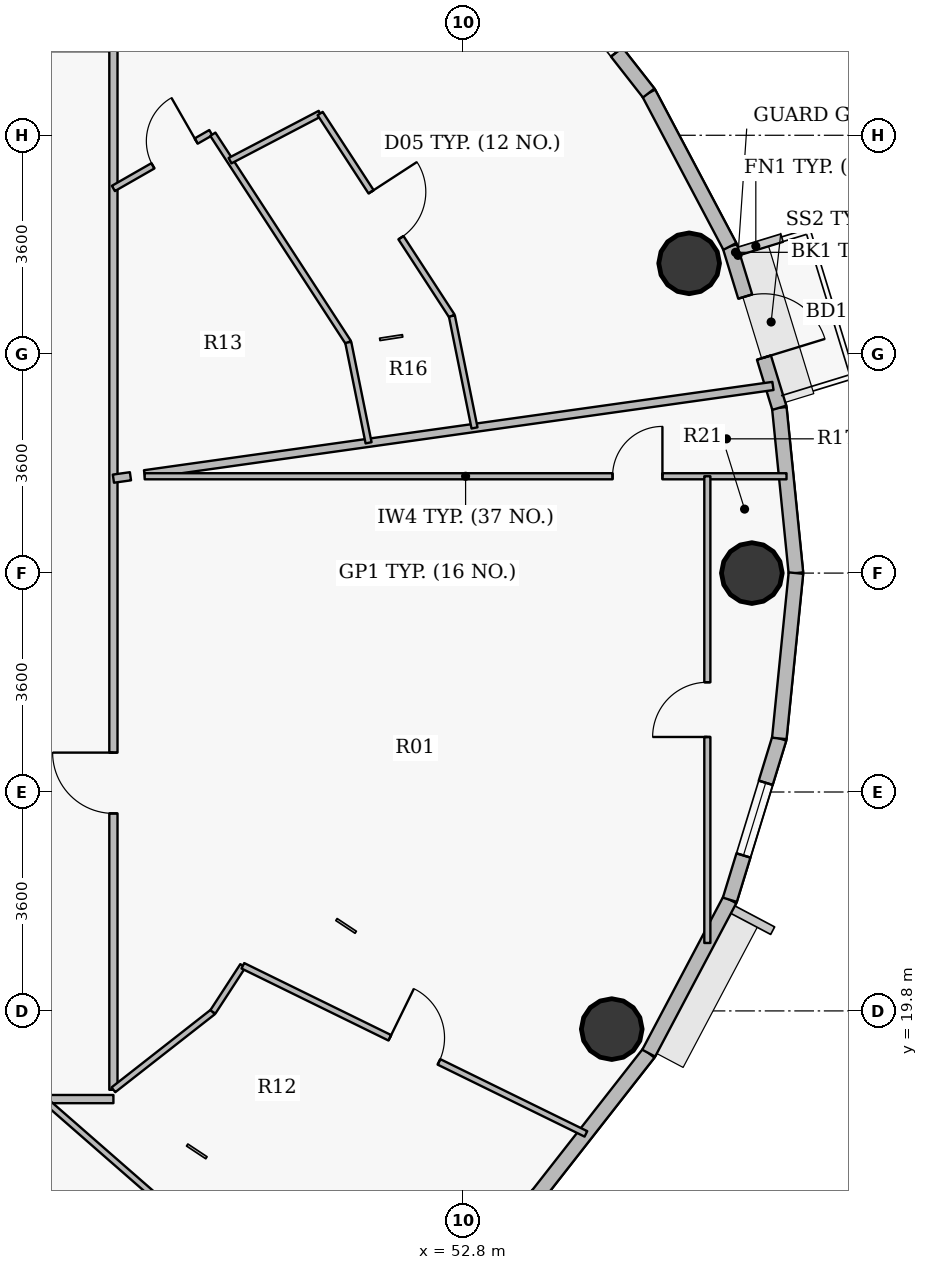
"""IFC4 building model, lengths in metres.
Left out: names, types, materials, properties, quantities, classifications, styles, units other than length and angle.
Written with IfcOpenShell. Run it as: python <this file> out.ifc"""

import sys

from ifc_helpers import new_model, si_unit, direction, frame, frame_2d, origin, origin_2d, place, context, subcontext, project, spatial, rectangle, hollow_circle, extrude, source, transform, mapped, element, fill, save


model = new_model("IFC4")
c1 = context("Model", 3, precision=1e-05, world=origin(), true_north=direction((0.0, 1.0)))
c2 = subcontext(c1, "Body", "Model", "MODEL_VIEW")
j1 = project(units=[si_unit("LENGTHUNIT", "METRE"), si_unit("PLANEANGLEUNIT", "RADIAN")], contexts=[c1])
p1 = place(None, origin())
s1 = spatial("IfcSite", under=j1, at=p1, CompositionType="ELEMENT")
p2 = place(p1, origin())
s2 = spatial("IfcBuilding", under=s1, at=p2, CompositionType="ELEMENT")
p3 = place(p2, frame((0.0, 0.0, 273.0)))
s3 = spatial("IfcBuildingStorey", under=s2, at=p3, CompositionType="ELEMENT", Elevation=273.0)
for number, where, z_axis, x_axis in (
    (1, (57.55, 27.0, 0.0), (0.0, 0.0, 1.0), (1.0, 0.0, 0.0)),
    (2, (56.519, 32.094, 0.0), (0.0, 0.0, 1.0), (1.0, 0.0, 0.0)),
    (3, (55.246, 19.5, 0.0), (0.0, 0.0, 1.0), (1.0, 0.0, 0.0)),
):
    element("IfcColumn", number, at=place(p3, frame(where, z_axis=z_axis, x_axis=x_axis)), inside=s3, PredefinedType="COLUMN", context=c2, shape_type="SweptSolid", body=[
        extrude(hollow_circle(Radius=0.5, WallThickness=0.032, at=origin_2d()), origin(), (0.0, 0.0, 1.0), 3.75),
    ])
p4 = place(p3, frame((58.002, 29.719, 0.0), z_axis=(0.0, 0.0, 1.0), x_axis=(0.099972526841, -0.99499019788, 0.0)))
e4 = element("IfcWall", 4, at=p4, inside=s3, PredefinedType="SOLIDWALL", context=c2, shape_type="SweptSolid", body=[
    extrude(rectangle(XDim=2.733, YDim=0.24, at=frame_2d((1.366, 0.0))), origin(), (0.0, 0.0, 1.0), 3.5),
])
p5 = place(p3, frame((57.188, 32.372, 0.0), z_axis=(0.0, 0.0, 1.0), x_axis=(0.2931213403, -0.956075248012, 0.0)))
e5 = element("IfcWall", 5, at=p5, inside=s3, PredefinedType="SOLIDWALL", context=c2, shape_type="SweptSolid", body=[
    extrude(rectangle(XDim=2.775, YDim=0.24, at=frame_2d((1.388, 0.0))), origin(), (0.0, 0.0, 1.0), 3.5),
])
p6 = place(p5, frame((0.863, 0.0, 0.0)))
e6 = element("IfcOpeningElement", 6, at=p6, cuts=e5, PredefinedType="OPENING", context=c2, shape_type="SweptSolid", body=[
    extrude(rectangle(XDim=1.05, YDim=2.15, at=origin_2d()), frame((0.525, 0.13, 1.075), z_axis=(0.0, -1.0, 0.0), x_axis=(1.0, 0.0, 0.0)), (0.0, 0.0, 1.0), 0.26),
])
p7 = place(p3, frame((55.854, 34.895, 0.0), z_axis=(0.0, 0.0, 1.0), x_axis=(0.467628269026, -0.883925224218, 0.0)))
e7 = element("IfcWall", 7, at=p7, inside=s3, PredefinedType="SOLIDWALL", context=c2, shape_type="SweptSolid", body=[
    extrude(rectangle(XDim=2.854, YDim=0.24, at=frame_2d((1.427, 0.0))), origin(), (0.0, 0.0, 1.0), 3.5),
])
p8 = place(p3, frame((54.03, 37.225, 0.0), z_axis=(0.0, 0.0, 1.0), x_axis=(0.616337186556, -0.787482363275, 0.0)))
e8 = element("IfcWall", 8, at=p8, inside=s3, PredefinedType="SOLIDWALL", context=c2, shape_type="SweptSolid", body=[
    extrude(rectangle(XDim=2.958, YDim=0.24, at=frame_2d((1.479, 0.0))), origin(), (0.0, 0.0, 1.0), 3.5),
])
p9 = place(p8, frame((0.854, 0.0, 0.9)))
e9 = element("IfcOpeningElement", 9, at=p9, cuts=e8, PredefinedType="OPENING", context=c2, shape_type="SweptSolid", body=[
    extrude(rectangle(XDim=1.25, YDim=1.65, at=origin_2d()), frame((0.625, 0.13, 0.825), z_axis=(0.0, -1.0, 0.0), x_axis=(1.0, 0.0, 0.0)), (0.0, 0.0, 1.0), 0.26),
])
p10 = place(p3, frame((54.03, 16.775, 0.0), z_axis=(0.0, 0.0, 1.0), x_axis=(-0.737068506972, -0.675818034703, 0.0)))
e10 = element("IfcWall", 10, at=p10, inside=s3, PredefinedType="SOLIDWALL", context=c2, shape_type="SweptSolid", body=[
    extrude(rectangle(XDim=3.077, YDim=0.24, at=frame_2d((1.539, 0.0))), origin(), (0.0, 0.0, 1.0), 3.5),
])
p11 = place(p3, frame((55.854, 19.105, 0.0), z_axis=(0.0, 0.0, 1.0), x_axis=(-0.616337186556, -0.787482363275, 0.0)))
e11 = element("IfcWall", 11, at=p11, inside=s3, PredefinedType="SOLIDWALL", context=c2, shape_type="SweptSolid", body=[
    extrude(rectangle(XDim=2.958, YDim=0.24, at=frame_2d((1.479, 0.0))), origin(), (0.0, 0.0, 1.0), 3.5),
])
p12 = place(p3, frame((57.188, 21.628, 0.0), z_axis=(0.0, 0.0, 1.0), x_axis=(-0.467628269026, -0.883925224218, 0.0)))
e12 = element("IfcWall", 12, at=p12, inside=s3, PredefinedType="SOLIDWALL", context=c2, shape_type="SweptSolid", body=[
    extrude(rectangle(XDim=2.854, YDim=0.24, at=frame_2d((1.427, 0.0))), origin(), (0.0, 0.0, 1.0), 3.5),
])
p13 = place(p3, frame((58.002, 24.281, 0.0), z_axis=(0.0, 0.0, 1.0), x_axis=(-0.2931213403, -0.956075248012, 0.0)))
e13 = element("IfcWall", 13, at=p13, inside=s3, PredefinedType="SOLIDWALL", context=c2, shape_type="SweptSolid", body=[
    extrude(rectangle(XDim=2.775, YDim=0.24, at=frame_2d((1.388, 0.0))), origin(), (0.0, 0.0, 1.0), 3.5),
])
p14 = place(p13, frame((0.763, 0.0, 0.9)))
e14 = element("IfcOpeningElement", 14, at=p14, cuts=e13, PredefinedType="OPENING", context=c2, shape_type="SweptSolid", body=[
    extrude(rectangle(XDim=1.25, YDim=1.65, at=origin_2d()), frame((0.625, 0.13, 0.825), z_axis=(0.0, -1.0, 0.0), x_axis=(1.0, 0.0, 0.0)), (0.0, 0.0, 1.0), 0.26),
])
p15 = place(p3, frame((58.275, 27.0, 0.0), z_axis=(0.0, 0.0, 1.0), x_axis=(-0.099972526841, -0.99499019788, 0.0)))
e15 = element("IfcWall", 15, at=p15, inside=s3, PredefinedType="SOLIDWALL", context=c2, shape_type="SweptSolid", body=[
    extrude(rectangle(XDim=2.733, YDim=0.24, at=frame_2d((1.366, 0.0))), origin(), (0.0, 0.0, 1.0), 3.5),
])
p16 = place(p3, frame((36.95, 18.35, 0.0), z_axis=(0.0, 0.0, 1.0), x_axis=(1.0, 0.0, 0.0)))
e16 = element("IfcWall", 16, at=p16, inside=s3, PredefinedType="PARTITIONING", context=c2, shape_type="SweptSolid", body=[
    extrude(rectangle(XDim=10.1, YDim=0.135, at=frame_2d((5.05, 0.0))), origin(), (0.0, 0.0, 1.0), 3.035),
])
p17 = place(p16, frame((1.521, 0.0, 0.0)))
e17 = element("IfcOpeningElement", 17, at=p17, cuts=e16, PredefinedType="OPENING", context=c2, shape_type="SweptSolid", body=[
    extrude(rectangle(XDim=1.0, YDim=2.15, at=origin_2d()), frame((0.5, 0.078, 1.075), z_axis=(0.0, -1.0, 0.0), x_axis=(1.0, 0.0, 0.0)), (0.0, 0.0, 1.0), 0.155),
])
p18 = place(p3, frame((45.901, 18.35, 0.0), z_axis=(0.0, 0.0, 1.0), x_axis=(0.753056223084, -0.657956172457, 0.0)))
e18 = element("IfcWall", 18, at=p18, inside=s3, PredefinedType="PARTITIONING", context=c2, shape_type="SweptSolid", body=[
    extrude(rectangle(XDim=6.526, YDim=0.1, at=frame_2d((3.263, 0.0))), origin(), (0.0, 0.0, 1.0), 2.985),
])
p19 = place(p18, frame((2.813, 0.0, 0.0)))
e19 = element("IfcOpeningElement", 19, at=p19, cuts=e18, PredefinedType="OPENING", context=c2, shape_type="SweptSolid", body=[
    extrude(rectangle(XDim=0.9, YDim=2.1, at=origin_2d()), frame((0.45, 0.06, 1.05), z_axis=(0.0, -1.0, 0.0), x_axis=(1.0, 0.0, 0.0)), (0.0, 0.0, 1.0), 0.12),
])
p20 = place(p3, frame((47.05, 18.503, 0.0), z_axis=(0.0, 0.0, 1.0), x_axis=(0.0, 1.0, 0.0)))
e20 = element("IfcWall", 20, at=p20, inside=s3, PredefinedType="PARTITIONING", context=c2, shape_type="SweptSolid", body=[
    extrude(rectangle(XDim=17.147, YDim=0.135, at=frame_2d((8.574, 0.0))), origin(), (0.0, 0.0, 1.0), 3.035),
])
p21 = place(p20, frame((4.545, 0.0, 0.0)))
e21 = element("IfcOpeningElement", 21, at=p21, cuts=e20, PredefinedType="OPENING", context=c2, shape_type="SweptSolid", body=[
    extrude(rectangle(XDim=1.0, YDim=2.15, at=origin_2d()), frame((0.5, 0.078, 1.075), z_axis=(0.0, -1.0, 0.0), x_axis=(1.0, 0.0, 0.0)), (0.0, 0.0, 1.0), 0.155),
])
p22 = place(p3, frame((47.05, 18.503, 0.0), z_axis=(0.0, 0.0, 1.0), x_axis=(0.787328855274, 0.616533270516, 0.0)))
e22 = element("IfcWall", 22, at=p22, inside=s3, PredefinedType="PARTITIONING", context=c2, shape_type="SweptSolid", body=[
    extrude(rectangle(XDim=2.077, YDim=0.1, at=frame_2d((1.039, 0.0))), origin(), (0.0, 0.0, 1.0), 3.035),
])
p23 = place(p3, frame((47.05, 28.553, 0.0), z_axis=(0.0, 0.0, 1.0), x_axis=(0.990308552968, 0.138884736087, 0.0)))
e23 = element("IfcWall", 23, at=p23, inside=s3, PredefinedType="PARTITIONING", context=c2, shape_type="SweptSolid", body=[
    extrude(rectangle(XDim=0.283, YDim=0.135, at=frame_2d((0.142, 0.0))), origin(), (0.0, 0.0, 1.0), 3.5),
])
p24 = place(p3, frame((47.05, 33.326, 0.0), z_axis=(0.0, 0.0, 1.0), x_axis=(0.867827775188, 0.496865125172, 0.0)))
e24 = element("IfcWall", 24, at=p24, inside=s3, PredefinedType="PARTITIONING", context=c2, shape_type="SweptSolid", body=[
    extrude(rectangle(XDim=1.846, YDim=0.1, at=frame_2d((0.923, 0.0))), origin(), (0.0, 0.0, 1.0), 3.5),
])
p25 = place(p24, frame((0.749, 0.0, 0.0)))
e25 = element("IfcOpeningElement", 25, at=p25, cuts=e24, PredefinedType="OPENING", context=c2, shape_type="SweptSolid", body=[
    extrude(rectangle(XDim=0.82, YDim=2.1, at=origin_2d()), frame((0.41, 0.06, 1.05), z_axis=(0.0, -1.0, 0.0), x_axis=(1.0, 0.0, 0.0)), (0.0, 0.0, 1.0), 0.12),
])
p26 = place(p3, frame((47.562, 28.625, 0.0), z_axis=(0.0, 0.0, 1.0), x_axis=(0.990269276455, 0.139164507362, 0.0)))
e26 = element("IfcWall", 26, at=p26, inside=s3, PredefinedType="PARTITIONING", context=c2, shape_type="SweptSolid", body=[
    extrude(rectangle(XDim=10.437, YDim=0.135, at=frame_2d((5.218, 0.0))), origin(), (0.0, 0.0, 1.0), 2.985),
])
p27 = place(p3, frame((47.564, 28.592, 0.0), z_axis=(0.0, 0.0, 1.0), x_axis=(1.0, 0.0, 0.0)))
e27 = element("IfcWall", 27, at=p27, inside=s3, PredefinedType="PARTITIONING", context=c2, shape_type="SweptSolid", body=[
    extrude(rectangle(XDim=10.555, YDim=0.1, at=frame_2d((5.278, 0.0))), origin(), (0.0, 0.0, 1.0), 2.985),
])
p28 = place(p27, frame((7.695, 0.0, 0.0)))
e28 = element("IfcOpeningElement", 28, at=p28, cuts=e27, PredefinedType="OPENING", context=c2, shape_type="SweptSolid", body=[
    extrude(rectangle(XDim=0.82, YDim=2.1, at=origin_2d()), frame((0.41, 0.06, 1.05), z_axis=(0.0, -1.0, 0.0), x_axis=(1.0, 0.0, 0.0)), (0.0, 0.0, 1.0), 0.12),
])
p29 = place(p3, frame((48.685, 19.783, 0.0), z_axis=(0.0, 0.0, 1.0), x_axis=(0.545519027777, 0.838098437138, 0.0)))
e29 = element("IfcWall", 29, at=p29, inside=s3, PredefinedType="PARTITIONING", context=c2, shape_type="SweptSolid", body=[
    extrude(rectangle(XDim=0.905, YDim=0.1, at=frame_2d((0.453, 0.0))), origin(), (0.0, 0.0, 1.0), 3.5),
])
p30 = place(p3, frame((48.685, 34.217, 0.0), z_axis=(0.0, 0.0, 1.0), x_axis=(0.54540855562, -0.8381703332, 0.0)))
e30 = element("IfcWall", 30, at=p30, inside=s3, PredefinedType="PARTITIONING", context=c2, shape_type="SweptSolid", body=[
    extrude(rectangle(XDim=4.084, YDim=0.1, at=frame_2d((2.042, 0.0))), origin(), (0.0, 0.0, 1.0), 3.035),
])
p31 = place(p3, frame((48.968, 33.782, 0.0), z_axis=(0.0, 0.0, 1.0), x_axis=(0.886102824681, 0.463488709779, 0.0)))
e31 = element("IfcWall", 31, at=p31, inside=s3, PredefinedType="PARTITIONING", context=c2, shape_type="SweptSolid", body=[
    extrude(rectangle(XDim=1.672, YDim=0.1, at=frame_2d((0.836, 0.0))), origin(), (0.0, 0.0, 1.0), 3.5),
])
p32 = place(p3, frame((49.179, 20.542, 0.0), z_axis=(0.0, 0.0, 1.0), x_axis=(0.89799659679, -0.440002400167, 0.0)))
e32 = element("IfcWall", 32, at=p32, inside=s3, PredefinedType="PARTITIONING", context=c2, shape_type="SweptSolid", body=[
    extrude(rectangle(XDim=6.283, YDim=0.1, at=frame_2d((3.141, 0.0))), origin(), (0.0, 0.0, 1.0), 2.985),
])
p33 = place(p32, frame((2.691, 0.0, 0.0)))
e33 = element("IfcOpeningElement", 33, at=p33, cuts=e32, PredefinedType="OPENING", context=c2, shape_type="SweptSolid", body=[
    extrude(rectangle(XDim=0.9, YDim=2.1, at=origin_2d()), frame((0.45, 0.06, 1.05), z_axis=(0.0, -1.0, 0.0), x_axis=(1.0, 0.0, 0.0)), (0.0, 0.0, 1.0), 0.12),
])
p34 = place(p3, frame((50.45, 34.558, 0.0), z_axis=(0.0, 0.0, 1.0), x_axis=(0.545448348881, -0.838144437853, 0.0)))
e34 = element("IfcWall", 34, at=p34, inside=s3, PredefinedType="PARTITIONING", context=c2, shape_type="SweptSolid", body=[
    extrude(rectangle(XDim=3.973, YDim=0.1, at=frame_2d((1.986, 0.0))), origin(), (0.0, 0.0, 1.0), 3.035),
])
p35 = place(p34, frame((1.536, 0.0, 0.0)))
e35 = element("IfcOpeningElement", 35, at=p35, cuts=e34, PredefinedType="OPENING", context=c2, shape_type="SweptSolid", body=[
    extrude(rectangle(XDim=0.9, YDim=2.1, at=origin_2d()), frame((0.45, 0.06, 1.05), z_axis=(0.0, -1.0, 0.0), x_axis=(1.0, 0.0, 0.0)), (0.0, 0.0, 1.0), 0.12),
])
p36 = place(p3, frame((50.913, 30.794, 0.0), z_axis=(0.0, 0.0, 1.0), x_axis=(0.198233557602, -0.980154812588, 0.0)))
e36 = element("IfcWall", 36, at=p36, inside=s3, PredefinedType="PARTITIONING", context=c2, shape_type="SweptSolid", body=[
    extrude(rectangle(XDim=1.685, YDim=0.1, at=frame_2d((0.842, 0.0))), origin(), (0.0, 0.0, 1.0), 3.035),
])
p37 = place(p3, frame((52.617, 31.228, 0.0), z_axis=(0.0, 0.0, 1.0), x_axis=(0.198191443997, -0.980163329005, 0.0)))
e37 = element("IfcWall", 37, at=p37, inside=s3, PredefinedType="PARTITIONING", context=c2, shape_type="SweptSolid", body=[
    extrude(rectangle(XDim=1.877, YDim=0.1, at=frame_2d((0.939, 0.0))), origin(), (0.0, 0.0, 1.0), 3.035),
])
p38 = place(p3, frame((56.818, 20.917, 0.0), z_axis=(0.0, 0.0, 1.0), x_axis=(0.0, 1.0, 0.0)))
e38 = element("IfcWall", 38, at=p38, inside=s3, PredefinedType="PARTITIONING", context=c2, shape_type="SweptSolid", body=[
    extrude(rectangle(XDim=7.675, YDim=0.1, at=frame_2d((3.837, 0.0))), origin(), (0.0, 0.0, 1.0), 2.985),
])
p39 = place(p38, frame((3.388, 0.0, 0.0)))
e39 = element("IfcOpeningElement", 39, at=p39, cuts=e38, PredefinedType="OPENING", context=c2, shape_type="SweptSolid", body=[
    extrude(rectangle(XDim=0.9, YDim=2.1, at=origin_2d()), frame((0.45, 0.06, 1.05), z_axis=(0.0, -1.0, 0.0), x_axis=(1.0, 0.0, 0.0)), (0.0, 0.0, 1.0), 0.12),
])
m1 = source(origin(), c2, "Body", "SweptSolid", [
    extrude(rectangle(XDim=1.05, YDim=2.15, at=origin_2d()), frame((0.525, 0.025, 1.075), z_axis=(0.0, -1.0, 0.0), x_axis=(1.0, 0.0, 0.0)), (0.0, 0.0, 1.0), 0.05),
])
p40 = place(p6, origin())
e40 = element("IfcDoor", 40, at=p40, inside=s3, OperationType="SINGLE_SWING_RIGHT", PredefinedType="DOOR", context=c2, shape_type="MappedRepresentation", body=[
    mapped(m1, transform((0.0, 0.0, 0.0), x_axis=(1.0, 0.0, 0.0), y_axis=(0.0, 1.0, 0.0), z_axis=(0.0, 0.0, 1.0), scale=1.0)),
])
fill(e6, e40)
m2 = source(origin(), c2, "Body", "SweptSolid", [
    extrude(rectangle(XDim=1.25, YDim=1.65, at=origin_2d()), frame((0.625, 0.03, 0.825), z_axis=(0.0, -1.0, 0.0), x_axis=(1.0, 0.0, 0.0)), (0.0, 0.0, 1.0), 0.06),
])
p41 = place(p9, origin())
e41 = element("IfcWindow", 41, at=p41, inside=s3, PartitioningType="SINGLE_PANEL", PredefinedType="WINDOW", context=c2, shape_type="MappedRepresentation", body=[
    mapped(m2, transform((0.0, 0.0, 0.0), x_axis=(1.0, 0.0, 0.0), y_axis=(0.0, 1.0, 0.0), z_axis=(0.0, 0.0, 1.0), scale=1.0)),
])
fill(e9, e41)
p42 = place(p14, origin())
e42 = element("IfcWindow", 42, at=p42, inside=s3, PartitioningType="SINGLE_PANEL", PredefinedType="WINDOW", context=c2, shape_type="MappedRepresentation", body=[
    mapped(m2, transform((0.0, 0.0, 0.0), x_axis=(1.0, 0.0, 0.0), y_axis=(0.0, 1.0, 0.0), z_axis=(0.0, 0.0, 1.0), scale=1.0)),
])
fill(e14, e42)
m3 = source(origin(), c2, "Body", "SweptSolid", [
    extrude(rectangle(XDim=0.82, YDim=2.1, at=origin_2d()), frame((0.41, 0.025, 1.05), z_axis=(0.0, -1.0, 0.0), x_axis=(1.0, 0.0, 0.0)), (0.0, 0.0, 1.0), 0.05),
])
p43 = place(p25, origin())
e43 = element("IfcDoor", 43, at=p43, inside=s3, OperationType="SINGLE_SWING_RIGHT", PredefinedType="DOOR", context=c2, shape_type="MappedRepresentation", body=[
    mapped(m3, transform((0.0, 0.0, 0.0), x_axis=(1.0, 0.0, 0.0), y_axis=(0.0, 1.0, 0.0), z_axis=(0.0, 0.0, 1.0), scale=1.0)),
])
fill(e25, e43)
m4 = source(origin(), c2, "Body", "SweptSolid", [
    extrude(rectangle(XDim=0.9, YDim=2.1, at=origin_2d()), frame((0.45, 0.025, 1.05), z_axis=(0.0, -1.0, 0.0), x_axis=(1.0, 0.0, 0.0)), (0.0, 0.0, 1.0), 0.05),
])
p44 = place(p35, origin())
e44 = element("IfcDoor", 44, at=p44, inside=s3, OperationType="SINGLE_SWING_LEFT", PredefinedType="DOOR", context=c2, shape_type="MappedRepresentation", body=[
    mapped(m4, transform((0.0, 0.0, 0.0), x_axis=(1.0, 0.0, 0.0), y_axis=(0.0, 1.0, 0.0), z_axis=(0.0, 0.0, 1.0), scale=1.0)),
])
fill(e35, e44)
m5 = source(origin(), c2, "Body", "SweptSolid", [
    extrude(rectangle(XDim=1.0, YDim=2.15, at=origin_2d()), frame((0.5, 0.025, 1.075), z_axis=(0.0, -1.0, 0.0), x_axis=(1.0, 0.0, 0.0)), (0.0, 0.0, 1.0), 0.05),
])
p45 = place(p21, origin())
e45 = element("IfcDoor", 45, at=p45, inside=s3, OperationType="SINGLE_SWING_RIGHT", PredefinedType="DOOR", context=c2, shape_type="MappedRepresentation", body=[
    mapped(m5, transform((0.0, 0.0, 0.0), x_axis=(1.0, 0.0, 0.0), y_axis=(0.0, 1.0, 0.0), z_axis=(0.0, 0.0, 1.0), scale=1.0)),
])
fill(e21, e45)
p46 = place(p33, origin())
e46 = element("IfcDoor", 46, at=p46, inside=s3, OperationType="SINGLE_SWING_LEFT", PredefinedType="DOOR", context=c2, shape_type="MappedRepresentation", body=[
    mapped(m4, transform((0.0, 0.0, 0.0), x_axis=(1.0, 0.0, 0.0), y_axis=(0.0, 1.0, 0.0), z_axis=(0.0, 0.0, 1.0), scale=1.0)),
])
fill(e33, e46)
p47 = place(p28, origin())
e47 = element("IfcDoor", 47, at=p47, inside=s3, OperationType="SINGLE_SWING_RIGHT", PredefinedType="DOOR", context=c2, shape_type="MappedRepresentation", body=[
    mapped(m3, transform((0.0, 0.0, 0.0), x_axis=(1.0, 0.0, 0.0), y_axis=(0.0, 1.0, 0.0), z_axis=(0.0, 0.0, 1.0), scale=1.0)),
])
fill(e28, e47)
p48 = place(p39, origin())
e48 = element("IfcDoor", 48, at=p48, inside=s3, OperationType="SINGLE_SWING_LEFT", PredefinedType="DOOR", context=c2, shape_type="MappedRepresentation", body=[
    mapped(m4, transform((0.0, 0.0, 0.0), x_axis=(1.0, 0.0, 0.0), y_axis=(0.0, 1.0, 0.0), z_axis=(0.0, 0.0, 1.0), scale=1.0)),
])
fill(e39, e48)
save(model, sys.argv[1])
